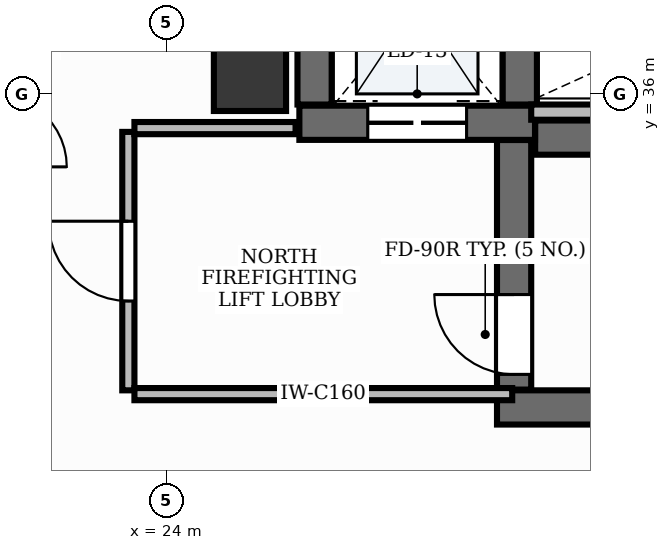
"""IFC4 building model, lengths in metres.
Left out: names, types, materials, properties, quantities, classifications, styles, units other than length and angle.
Written with IfcOpenShell. Run it as: python <this file> out.ifc"""

import sys

from ifc_helpers import new_model, si_unit, direction, frame, frame_2d, origin, origin_2d, place, context, subcontext, project, spatial, rectangle, extrude, element, fill, save


model = new_model("IFC4")
c1 = context("Model", 3, precision=1e-05, world=origin(), true_north=direction((0.0, 1.0)))
c2 = subcontext(c1, "Body", "Model", "MODEL_VIEW")
j1 = project(units=[si_unit("LENGTHUNIT", "METRE"), si_unit("PLANEANGLEUNIT", "RADIAN")], contexts=[c1])
p1 = place(None, origin())
s1 = spatial("IfcSite", under=j1, at=p1, CompositionType="ELEMENT")
p2 = place(p1, origin())
s2 = spatial("IfcBuilding", under=s1, at=p2, CompositionType="ELEMENT")
p3 = place(p2, frame((0.0, 0.0, 136.2)))
s3 = spatial("IfcBuildingStorey", under=s2, at=p3, CompositionType="ELEMENT", Elevation=136.2)
p4 = place(p3, frame((28.852, 35.425, 0.0), z_axis=(0.0, 0.0, 1.0), x_axis=(1.0, 0.0, 0.0)))
e1 = element("IfcWall", 1, at=p4, inside=s3, PredefinedType="SHEAR", context=c2, shape_type="SweptSolid", body=[
    extrude(rectangle(XDim=8.248, YDim=0.45, at=frame_2d((4.124, 0.0))), origin(), (0.0, 0.0, 1.0), 3.9),
])
p5 = place(p3, frame((28.35, 31.875, 0.0), z_axis=(0.0, 0.0, 1.0), x_axis=(1.0, 0.0, 0.0)))
e2 = element("IfcWall", 2, at=p5, inside=s3, PredefinedType="SHEAR", context=c2, shape_type="SweptSolid", body=[
    extrude(rectangle(XDim=8.75, YDim=0.45, at=frame_2d((4.375, 0.0))), origin(), (0.0, 0.0, 1.0), 3.9),
])
p6 = place(p3, frame((28.575, 32.11, 0.0), z_axis=(0.0, 0.0, 1.0), x_axis=(0.0, 1.0, 0.0)))
e3 = element("IfcWall", 3, at=p6, inside=s3, PredefinedType="SHEAR", context=c2, shape_type="SweptSolid", body=[
    extrude(rectangle(XDim=3.283, YDim=0.45, at=frame_2d((1.642, 0.0))), origin(), (0.0, 0.0, 1.0), 3.9),
])
p7 = place(p6, frame((0.2, 0.0, 0.0)))
e4 = element("IfcOpeningElement", 4, at=p7, cuts=e3, PredefinedType="OPENING", context=c2, shape_type="SweptSolid", body=[
    extrude(rectangle(XDim=1.05, YDim=2.15, at=frame_2d((0.525, 1.075))), frame((0.0, 0.24, 0.0), z_axis=(0.0, -1.0, 0.0), x_axis=(1.0, 0.0, 0.0)), (0.0, 0.0, 1.0), 0.48),
])
p8 = place(p3, frame((25.75, 35.62, 0.0), z_axis=(0.0, 0.0, 1.0), x_axis=(1.0, 0.0, 0.0)))
e5 = element("IfcWall", 5, at=p8, inside=s3, PredefinedType="SHEAR", context=c2, shape_type="SweptSolid", body=[
    extrude(rectangle(XDim=3.1, YDim=0.45, at=frame_2d((1.55, 0.0))), origin(), (0.0, 0.0, 1.0), 3.9),
])
p9 = place(p8, frame((0.9, 0.0, 0.0)))
e6 = element("IfcOpeningElement", 6, at=p9, cuts=e5, PredefinedType="OPENING", context=c2, shape_type="SweptSolid", body=[
    extrude(rectangle(XDim=1.3, YDim=2.2, at=frame_2d((0.65, 1.1))), frame((0.0, 0.24, 0.0), z_axis=(0.0, -1.0, 0.0), x_axis=(1.0, 0.0, 0.0)), (0.0, 0.0, 1.0), 0.48),
])
for number, where, z_axis, x_axis in (
    (7, (25.95, 35.86, 0.0), (0.0, 0.0, 1.0), (0.0, 1.0, 0.0)),
    (8, (28.65, 35.86, 0.0), (0.0, 0.0, 1.0), (0.0, 1.0, 0.0)),
):
    element("IfcWall", number, at=place(p3, frame(where, z_axis=z_axis, x_axis=x_axis)), inside=s3, PredefinedType="SHEAR", context=c2, shape_type="SweptSolid", body=[
        extrude(rectangle(XDim=2.7, YDim=0.45, at=frame_2d((1.35, 0.0))), origin(), (0.0, 0.0, 1.0), 3.9),
    ])
p10 = place(p3, frame((25.1, 36.25, -0.0), z_axis=(0.0, 0.0, 1.0), x_axis=(1.0, 0.0, 0.0)))
e9 = element("IfcColumn", 9, at=p10, inside=s3, PredefinedType="PILASTER", context=c2, shape_type="SweptSolid", body=[
    extrude(rectangle(XDim=0.95, YDim=0.95, at=origin_2d()), origin(), (0.0, 0.0, 1.0), 3.901),
])
p11 = place(p3, frame((28.8, 35.76, 0.0), z_axis=(0.0, 0.0, 1.0), x_axis=(1.0, 0.0, 0.0)))
e10 = element("IfcWall", 10, at=p11, inside=s3, PredefinedType="PARTITIONING", context=c2, shape_type="SweptSolid", body=[
    extrude(rectangle(XDim=4.57, YDim=0.2, at=frame_2d((2.285, 0.0))), origin(), (0.0, 0.0, 1.0), 2.91),
])
p12 = place(p3, frame((23.5, 32.1, 0.0), z_axis=(0.0, 0.0, 1.0), x_axis=(0.0, 1.0, 0.0)))
e11 = element("IfcWall", 11, at=p12, inside=s3, PredefinedType="PARTITIONING", context=c2, shape_type="SweptSolid", body=[
    extrude(rectangle(XDim=3.4, YDim=0.16, at=frame_2d((1.7, 0.0))), origin(), (0.0, 0.0, 1.0), 2.91),
])
p13 = place(p12, frame((1.175, 0.0, 0.0)))
e12 = element("IfcOpeningElement", 12, at=p13, cuts=e11, PredefinedType="OPENING", context=c2, shape_type="SweptSolid", body=[
    extrude(rectangle(XDim=1.05, YDim=2.15, at=frame_2d((0.525, 1.075))), frame((0.0, 0.095, 0.0), z_axis=(0.0, -1.0, 0.0), x_axis=(1.0, 0.0, 0.0)), (0.0, 0.0, 1.0), 0.19),
])
p14 = place(p3, frame((23.58, 32.05, 0.0), z_axis=(0.0, 0.0, 1.0), x_axis=(1.0, 0.0, 0.0)))
e13 = element("IfcWall", 13, at=p14, inside=s3, PredefinedType="PARTITIONING", context=c2, shape_type="SweptSolid", body=[
    extrude(rectangle(XDim=4.97, YDim=0.16, at=frame_2d((2.485, 0.0))), origin(), (0.0, 0.0, 1.0), 2.91),
])
p15 = place(p3, frame((23.58, 35.55, 0.0), z_axis=(0.0, 0.0, 1.0), x_axis=(1.0, 0.0, 0.0)))
e14 = element("IfcWall", 14, at=p15, inside=s3, PredefinedType="PARTITIONING", context=c2, shape_type="SweptSolid", body=[
    extrude(rectangle(XDim=2.12, YDim=0.16, at=frame_2d((1.06, 0.0))), origin(), (0.0, 0.0, 1.0), 2.91),
])
p16 = place(p7, origin())
e15 = element("IfcDoor", 15, at=p16, inside=s3, OperationType="SINGLE_SWING_RIGHT", PredefinedType="DOOR", context=c2, shape_type="SweptSolid", body=[
    extrude(rectangle(XDim=1.05, YDim=2.15, at=frame_2d((0.525, 1.075))), frame((0.0, 0.025, 0.0), z_axis=(0.0, -1.0, 0.0), x_axis=(1.0, 0.0, 0.0)), (0.0, 0.0, 1.0), 0.05),
])
fill(e4, e15)
p17 = place(p9, origin())
e16 = element("IfcDoor", 16, at=p17, inside=s3, OperationType="DOUBLE_DOOR_SLIDING", PredefinedType="DOOR", context=c2, shape_type="SweptSolid", body=[
    extrude(rectangle(XDim=1.3, YDim=2.2, at=frame_2d((0.65, 1.1))), frame((0.0, 0.025, 0.0), z_axis=(0.0, -1.0, 0.0), x_axis=(1.0, 0.0, 0.0)), (0.0, 0.0, 1.0), 0.05),
])
fill(e6, e16)
p18 = place(p13, origin())
e17 = element("IfcDoor", 17, at=p18, inside=s3, OperationType="SINGLE_SWING_RIGHT", PredefinedType="DOOR", context=c2, shape_type="SweptSolid", body=[
    extrude(rectangle(XDim=1.05, YDim=2.15, at=frame_2d((0.525, 1.075))), frame((0.0, 0.025, 0.0), z_axis=(0.0, -1.0, 0.0), x_axis=(1.0, 0.0, 0.0)), (0.0, 0.0, 1.0), 0.05),
])
fill(e12, e17)
save(model, sys.argv[1])
